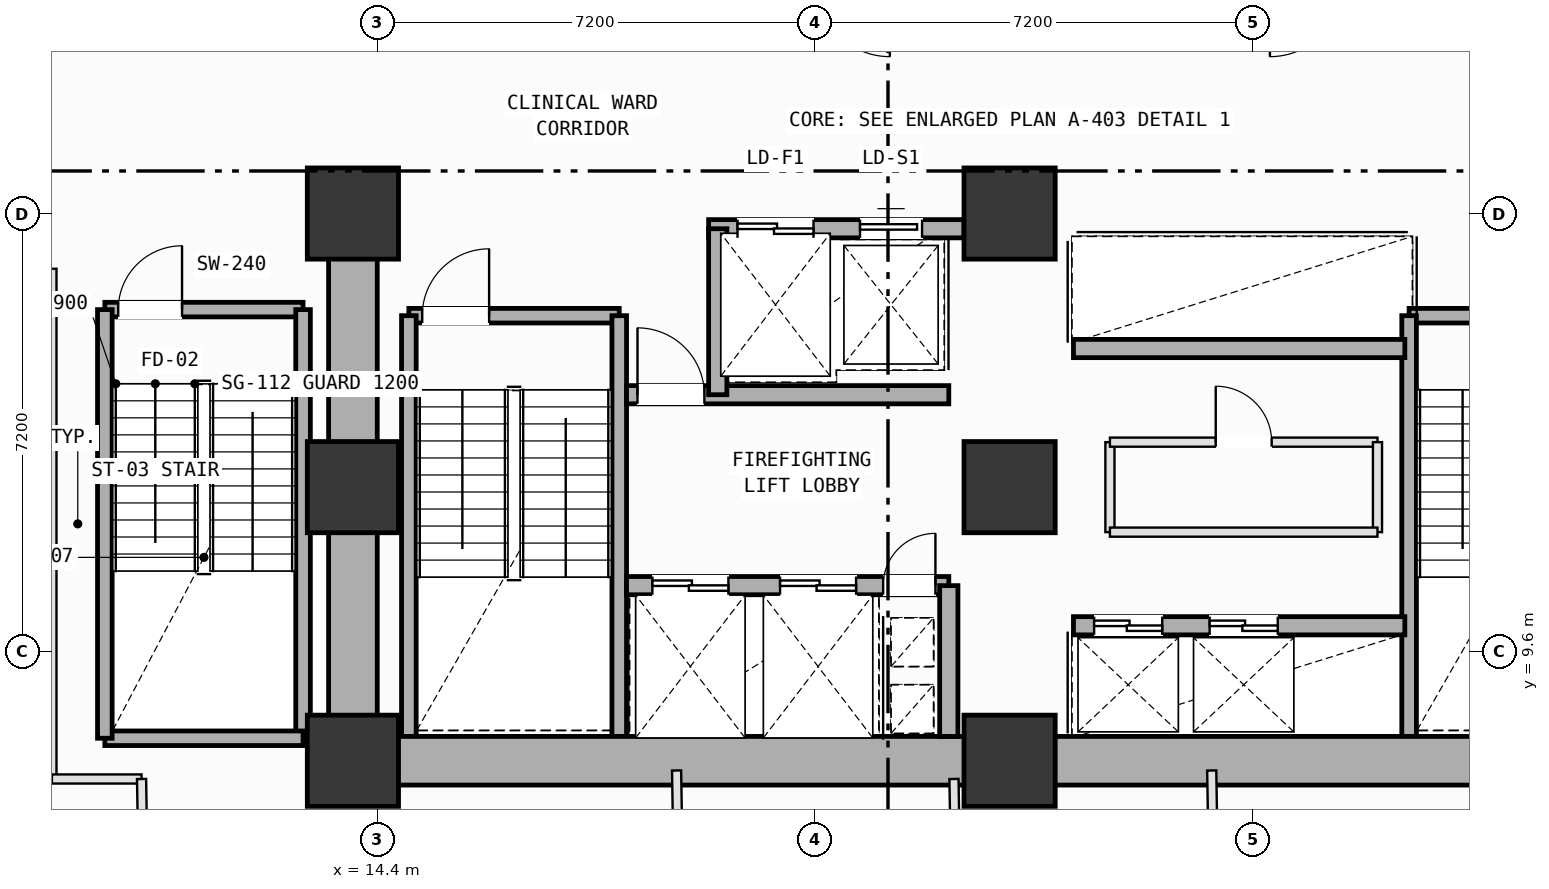
"""IFC4 building model, lengths in metres.
Left out: names, types, materials, properties, quantities, classifications, styles, units other than length and angle.
Written with IfcOpenShell. Run it as: python <this file> out.ifc"""

import sys

from ifc_helpers import new_model, si_unit, direction, frame, frame_2d, origin, origin_2d, place, context, subcontext, project, spatial, rectangle, extrude, element, fill, save


model = new_model("IFC4")
c1 = context("Model", 3, precision=1e-05, world=origin(), true_north=direction((0.0, 1.0)))
c2 = subcontext(c1, "Body", "Model", "MODEL_VIEW")
j1 = project(units=[si_unit("LENGTHUNIT", "METRE"), si_unit("PLANEANGLEUNIT", "RADIAN")], contexts=[c1])
p1 = place(None, origin())
s1 = spatial("IfcSite", under=j1, at=p1, CompositionType="ELEMENT")
p2 = place(p1, origin())
s2 = spatial("IfcBuilding", under=s1, at=p2, CompositionType="ELEMENT")
p3 = place(p2, frame((0.0, 0.0, 27.0)))
s3 = spatial("IfcBuildingStorey", under=s2, at=p3, CompositionType="ELEMENT", Elevation=27.0)
for number, where, z_axis, x_axis in (
    (1, (14.0, 7.8, 0.0), (0.0, 0.0, 1.0), (1.0, 0.0, 0.0)),
    (2, (14.0, 12.3, 0.0), (0.0, 0.0, 1.0), (1.0, 0.0, 0.0)),
    (3, (14.0, 16.8, 0.0), (0.0, 0.0, 1.0), (1.0, 0.0, 0.0)),
    (4, (24.8, 7.8, 0.0), (0.0, 0.0, 1.0), (1.0, 0.0, 0.0)),
    (5, (24.8, 12.3, 0.0), (0.0, 0.0, 1.0), (1.0, 0.0, 0.0)),
    (6, (24.8, 16.8, 0.0), (0.0, 0.0, 1.0), (1.0, 0.0, 0.0)),
):
    element("IfcColumn", number, at=place(p3, frame(where, z_axis=z_axis, x_axis=x_axis)), inside=s3, PredefinedType="COLUMN", context=c2, shape_type="SweptSolid", body=[
        extrude(rectangle(XDim=1.5, YDim=1.5, at=origin_2d()), origin(), (0.0, 0.0, 1.0), 4.0),
    ])
p4 = place(p3, frame((14.92, 15.12, 0.0), z_axis=(0.0, 0.0, 1.0), x_axis=(1.0, 0.0, 0.0)))
e7 = element("IfcWall", 7, at=p4, inside=s3, PredefinedType="SOLIDWALL", context=c2, shape_type="SweptSolid", body=[
    extrude(rectangle(XDim=3.46, YDim=0.24, at=frame_2d((1.73, 0.0))), origin(), (0.0, 0.0, 1.0), 3.78),
])
p5 = place(p4, frame((0.22, 0.0, 0.0)))
e8 = element("IfcOpeningElement", 8, at=p5, cuts=e7, PredefinedType="OPENING", context=c2, shape_type="SweptSolid", body=[
    extrude(rectangle(XDim=1.1, YDim=2.15, at=frame_2d((0.55, 1.075))), frame((0.0, 0.13, 0.0), z_axis=(0.0, -1.0, 0.0), x_axis=(1.0, 0.0, 0.0)), (0.0, 0.0, 1.0), 0.26),
])
for number, where, z_axis, x_axis in (
    (9, (18.38, 15.12, 0.0), (0.0, 0.0, 1.0), (0.0, -1.0, 0.0)),
    (10, (14.92, 8.2, 0.0), (0.0, 0.0, 1.0), (0.0, 1.0, 0.0)),
):
    element("IfcWall", number, at=place(p3, frame(where, z_axis=z_axis, x_axis=x_axis)), inside=s3, PredefinedType="SOLIDWALL", context=c2, shape_type="SweptSolid", body=[
        extrude(rectangle(XDim=6.92, YDim=0.24, at=frame_2d((3.46, 0.0))), origin(), (0.0, 0.0, 1.0), 3.78),
    ])
p6 = place(p3, frame((31.37, 15.12, 0.0), z_axis=(0.0, 0.0, 1.0), x_axis=(1.0, 0.0, 0.0)))
e11 = element("IfcWall", 11, at=p6, inside=s3, PredefinedType="SOLIDWALL", context=c2, shape_type="SweptSolid", body=[
    extrude(rectangle(XDim=3.46, YDim=0.24, at=frame_2d((1.73, 0.0))), origin(), (0.0, 0.0, 1.0), 3.78),
])
p7 = place(p6, frame((2.14, 0.0, 0.0)))
e12 = element("IfcOpeningElement", 12, at=p7, cuts=e11, PredefinedType="OPENING", context=c2, shape_type="SweptSolid", body=[
    extrude(rectangle(XDim=1.1, YDim=2.15, at=frame_2d((0.55, 1.075))), frame((0.0, 0.13, 0.0), z_axis=(0.0, -1.0, 0.0), x_axis=(1.0, 0.0, 0.0)), (0.0, 0.0, 1.0), 0.26),
])
p8 = place(p3, frame((31.37, 8.2, 0.0), z_axis=(0.0, 0.0, 1.0), x_axis=(0.0, 1.0, 0.0)))
e13 = element("IfcWall", 13, at=p8, inside=s3, PredefinedType="SOLIDWALL", context=c2, shape_type="SweptSolid", body=[
    extrude(rectangle(XDim=6.92, YDim=0.24, at=frame_2d((3.46, 0.0))), origin(), (0.0, 0.0, 1.0), 3.78),
])
p9 = place(p3, frame((9.92, 15.22, 0.0), z_axis=(0.0, 0.0, 1.0), x_axis=(1.0, 0.0, 0.0)))
e14 = element("IfcWall", 14, at=p9, inside=s3, PredefinedType="SOLIDWALL", context=c2, shape_type="SweptSolid", body=[
    extrude(rectangle(XDim=3.26, YDim=0.24, at=frame_2d((1.63, 0.0))), origin(), (0.0, 0.0, 1.0), 3.78),
])
p10 = place(p9, frame((0.22, 0.0, 0.0)))
e15 = element("IfcOpeningElement", 15, at=p10, cuts=e14, PredefinedType="OPENING", context=c2, shape_type="SweptSolid", body=[
    extrude(rectangle(XDim=1.05, YDim=2.15, at=frame_2d((0.525, 1.075))), frame((0.0, 0.13, 0.0), z_axis=(0.0, -1.0, 0.0), x_axis=(1.0, 0.0, 0.0)), (0.0, 0.0, 1.0), 0.26),
])
p11 = place(p3, frame((13.18, 15.22, 0.0), z_axis=(0.0, 0.0, 1.0), x_axis=(0.0, -1.0, 0.0)))
e16 = element("IfcWall", 16, at=p11, inside=s3, PredefinedType="SOLIDWALL", context=c2, shape_type="SweptSolid", body=[
    extrude(rectangle(XDim=7.05, YDim=0.24, at=frame_2d((3.525, 0.0))), origin(), (0.0, 0.0, 1.0), 3.78),
])
p12 = place(p3, frame((13.18, 8.17, 0.0), z_axis=(0.0, 0.0, 1.0), x_axis=(-1.0, 0.0, 0.0)))
e17 = element("IfcWall", 17, at=p12, inside=s3, PredefinedType="SOLIDWALL", context=c2, shape_type="SweptSolid", body=[
    extrude(rectangle(XDim=3.26, YDim=0.24, at=frame_2d((1.63, 0.0))), origin(), (0.0, 0.0, 1.0), 3.78),
])
p13 = place(p3, frame((9.92, 8.17, 0.0), z_axis=(0.0, 0.0, 1.0), x_axis=(0.0, 1.0, 0.0)))
e18 = element("IfcWall", 18, at=p13, inside=s3, PredefinedType="SOLIDWALL", context=c2, shape_type="SweptSolid", body=[
    extrude(rectangle(XDim=7.05, YDim=0.24, at=frame_2d((3.525, 0.0))), origin(), (0.0, 0.0, 1.0), 3.78),
])
for number, where, z_axis, x_axis in (
    (19, (14.0, 7.8, 0.0), (0.0, 0.0, 1.0), (1.0, 0.0, 0.0)),
    (20, (24.8, 7.8, 0.0), (0.0, 0.0, 1.0), (1.0, 0.0, 0.0)),
):
    element("IfcWall", number, at=place(p3, frame(where, z_axis=z_axis, x_axis=x_axis)), inside=s3, PredefinedType="SHEAR", context=c2, shape_type="SweptSolid", body=[
        extrude(rectangle(XDim=10.8, YDim=0.8, at=frame_2d((5.4, 0.0))), origin(), (0.0, 0.0, 1.0), 3.78),
    ])
p14 = place(p3, frame((14.0, 16.8, 0.0), z_axis=(0.0, 0.0, 1.0), x_axis=(0.0, -1.0, 0.0)))
e21 = element("IfcWall", 21, at=p14, inside=s3, PredefinedType="SHEAR", context=c2, shape_type="SweptSolid", body=[
    extrude(rectangle(XDim=9.0, YDim=0.8, at=frame_2d((4.5, 0.0))), origin(), (0.0, 0.0, 1.0), 3.78),
])
p15 = place(p3, frame((19.85, 16.55, 0.0), z_axis=(0.0, 0.0, 1.0), x_axis=(1.0, 0.0, 0.0)))
e22 = element("IfcWall", 22, at=p15, inside=s3, PredefinedType="SOLIDWALL", context=c2, shape_type="SweptSolid", body=[
    extrude(rectangle(XDim=4.2, YDim=0.3, at=frame_2d((2.1, 0.0))), origin(), (0.0, 0.0, 1.0), 3.78),
])
p16 = place(p15, frame((0.475, 0.0, 0.0)))
e23 = element("IfcOpeningElement", 23, at=p16, cuts=e22, PredefinedType="OPENING", context=c2, shape_type="SweptSolid", body=[
    extrude(rectangle(XDim=1.25, YDim=2.18, at=frame_2d((0.625, 1.09))), frame((0.0, 0.16, 0.0), z_axis=(0.0, -1.0, 0.0), x_axis=(1.0, 0.0, 0.0)), (0.0, 0.0, 1.0), 0.32),
])
p17 = place(p15, frame((2.49, 0.0, 0.0)))
e24 = element("IfcOpeningElement", 24, at=p17, cuts=e22, PredefinedType="OPENING", context=c2, shape_type="SweptSolid", body=[
    extrude(rectangle(XDim=1.02, YDim=2.12, at=frame_2d((0.51, 1.06))), frame((0.0, 0.16, 0.0), z_axis=(0.0, -1.0, 0.0), x_axis=(1.0, 0.0, 0.0)), (0.0, 0.0, 1.0), 0.32),
])
p18 = place(p3, frame((18.5, 10.68, 0.0), z_axis=(0.0, 0.0, 1.0), x_axis=(1.0, 0.0, 0.0)))
e25 = element("IfcWall", 25, at=p18, inside=s3, PredefinedType="SOLIDWALL", context=c2, shape_type="SweptSolid", body=[
    extrude(rectangle(XDim=5.3, YDim=0.3, at=frame_2d((2.65, 0.0))), origin(), (0.0, 0.0, 1.0), 3.78),
])
p19 = place(p18, frame((4.22, 0.0, 0.0)))
e26 = element("IfcOpeningElement", 26, at=p19, cuts=e25, PredefinedType="OPENING", context=c2, shape_type="SweptSolid", body=[
    extrude(rectangle(XDim=0.86, YDim=2.06, at=frame_2d((0.43, 1.03))), frame((0.0, 0.16, 0.0), z_axis=(0.0, -1.0, 0.0), x_axis=(1.0, 0.0, 0.0)), (0.0, 0.0, 1.0), 0.32),
])
p20 = place(p18, frame((0.425, 0.0, 0.0)))
e27 = element("IfcOpeningElement", 27, at=p20, cuts=e25, PredefinedType="OPENING", context=c2, shape_type="SweptSolid", body=[
    extrude(rectangle(XDim=1.25, YDim=2.18, at=frame_2d((0.625, 1.09))), frame((0.0, 0.16, 0.0), z_axis=(0.0, -1.0, 0.0), x_axis=(1.0, 0.0, 0.0)), (0.0, 0.0, 1.0), 0.32),
])
p21 = place(p18, frame((2.525, 0.0, 0.0)))
e28 = element("IfcOpeningElement", 28, at=p21, cuts=e25, PredefinedType="OPENING", context=c2, shape_type="SweptSolid", body=[
    extrude(rectangle(XDim=1.25, YDim=2.18, at=frame_2d((0.625, 1.09))), frame((0.0, 0.16, 0.0), z_axis=(0.0, -1.0, 0.0), x_axis=(1.0, 0.0, 0.0)), (0.0, 0.0, 1.0), 0.32),
])
p22 = place(p3, frame((18.5, 13.82, 0.0), z_axis=(0.0, 0.0, 1.0), x_axis=(1.0, 0.0, 0.0)))
e29 = element("IfcWall", 29, at=p22, inside=s3, PredefinedType="SOLIDWALL", context=c2, shape_type="SweptSolid", body=[
    extrude(rectangle(XDim=5.3, YDim=0.3, at=frame_2d((2.65, 0.0))), origin(), (0.0, 0.0, 1.0), 3.78),
])
p23 = place(p22, frame((0.18, 0.0, 0.0)))
e30 = element("IfcOpeningElement", 30, at=p23, cuts=e29, PredefinedType="OPENING", context=c2, shape_type="SweptSolid", body=[
    extrude(rectangle(XDim=1.1, YDim=2.15, at=frame_2d((0.55, 1.075))), frame((0.0, 0.16, 0.0), z_axis=(0.0, -1.0, 0.0), x_axis=(1.0, 0.0, 0.0)), (0.0, 0.0, 1.0), 0.32),
])
p24 = place(p3, frame((23.8, 8.2, 0.0), z_axis=(0.0, 0.0, 1.0), x_axis=(0.0, 1.0, 0.0)))
e31 = element("IfcWall", 31, at=p24, inside=s3, PredefinedType="SOLIDWALL", context=c2, shape_type="SweptSolid", body=[
    extrude(rectangle(XDim=2.48, YDim=0.3, at=frame_2d((1.24, 0.0))), origin(), (0.0, 0.0, 1.0), 3.78),
])
p25 = place(p3, frame((20.0, 13.82, 0.0), z_axis=(0.0, 0.0, 1.0), x_axis=(0.0, 1.0, 0.0)))
e32 = element("IfcWall", 32, at=p25, inside=s3, PredefinedType="SOLIDWALL", context=c2, shape_type="SweptSolid", body=[
    extrude(rectangle(XDim=2.73, YDim=0.3, at=frame_2d((1.365, 0.0))), origin(), (0.0, 0.0, 1.0), 3.78),
])
p26 = place(p3, frame((25.85, 10.02, 0.0), z_axis=(0.0, 0.0, 1.0), x_axis=(1.0, 0.0, 0.0)))
e33 = element("IfcWall", 33, at=p26, inside=s3, PredefinedType="SOLIDWALL", context=c2, shape_type="SweptSolid", body=[
    extrude(rectangle(XDim=5.45, YDim=0.3, at=frame_2d((2.725, 0.0))), origin(), (0.0, 0.0, 1.0), 3.78),
])
p27 = place(p26, frame((0.34, 0.0, 0.0)))
e34 = element("IfcOpeningElement", 34, at=p27, cuts=e33, PredefinedType="OPENING", context=c2, shape_type="SweptSolid", body=[
    extrude(rectangle(XDim=1.12, YDim=2.15, at=frame_2d((0.56, 1.075))), frame((0.0, 0.16, 0.0), z_axis=(0.0, -1.0, 0.0), x_axis=(1.0, 0.0, 0.0)), (0.0, 0.0, 1.0), 0.32),
])
p28 = place(p26, frame((2.24, 0.0, 0.0)))
e35 = element("IfcOpeningElement", 35, at=p28, cuts=e33, PredefinedType="OPENING", context=c2, shape_type="SweptSolid", body=[
    extrude(rectangle(XDim=1.12, YDim=2.15, at=frame_2d((0.56, 1.075))), frame((0.0, 0.16, 0.0), z_axis=(0.0, -1.0, 0.0), x_axis=(1.0, 0.0, 0.0)), (0.0, 0.0, 1.0), 0.32),
])
p29 = place(p3, frame((25.85, 14.58, 0.0), z_axis=(0.0, 0.0, 1.0), x_axis=(1.0, 0.0, 0.0)))
e36 = element("IfcWall", 36, at=p29, inside=s3, PredefinedType="SOLIDWALL", context=c2, shape_type="SweptSolid", body=[
    extrude(rectangle(XDim=5.45, YDim=0.3, at=frame_2d((2.725, 0.0))), origin(), (0.0, 0.0, 1.0), 3.78),
])
p30 = place(p3, frame((26.45, 11.56, 0.0), z_axis=(0.0, 0.0, 1.0), x_axis=(0.0, 1.0, 0.0)))
e37 = element("IfcWall", 37, at=p30, inside=s3, PredefinedType="PARTITIONING", context=c2, shape_type="SweptSolid", body=[
    extrude(rectangle(XDim=1.48, YDim=0.15, at=frame_2d((0.74, 0.0))), origin(), (0.0, 0.0, 1.0), 3.78),
])
p31 = place(p3, frame((26.45, 13.04, 0.0), z_axis=(0.0, 0.0, 1.0), x_axis=(1.0, 0.0, 0.0)))
e38 = element("IfcWall", 38, at=p31, inside=s3, PredefinedType="PARTITIONING", context=c2, shape_type="SweptSolid", body=[
    extrude(rectangle(XDim=4.4, YDim=0.15, at=frame_2d((2.2, 0.0))), origin(), (0.0, 0.0, 1.0), 3.78),
])
p32 = place(p31, frame((1.74, 0.0, 0.0)))
e39 = element("IfcOpeningElement", 39, at=p32, cuts=e38, PredefinedType="OPENING", context=c2, shape_type="SweptSolid", body=[
    extrude(rectangle(XDim=0.92, YDim=2.1, at=frame_2d((0.46, 1.05))), frame((0.0, 0.085, 0.0), z_axis=(0.0, -1.0, 0.0), x_axis=(1.0, 0.0, 0.0)), (0.0, 0.0, 1.0), 0.17),
])
p33 = place(p3, frame((30.85, 13.04, 0.0), z_axis=(0.0, 0.0, 1.0), x_axis=(0.0, -1.0, 0.0)))
e40 = element("IfcWall", 40, at=p33, inside=s3, PredefinedType="PARTITIONING", context=c2, shape_type="SweptSolid", body=[
    extrude(rectangle(XDim=1.48, YDim=0.15, at=frame_2d((0.74, 0.0))), origin(), (0.0, 0.0, 1.0), 3.78),
])
p34 = place(p3, frame((30.85, 11.56, 0.0), z_axis=(0.0, 0.0, 1.0), x_axis=(-1.0, 0.0, 0.0)))
e41 = element("IfcWall", 41, at=p34, inside=s3, PredefinedType="PARTITIONING", context=c2, shape_type="SweptSolid", body=[
    extrude(rectangle(XDim=4.4, YDim=0.15, at=frame_2d((2.2, 0.0))), origin(), (0.0, 0.0, 1.0), 3.78),
])
p35 = place(p3, frame((9.05, 15.892, 0.0), z_axis=(0.0, 0.0, 1.0), x_axis=(0.0, -1.0, 0.0)))
e42 = element("IfcWall", 42, at=p35, inside=s3, PredefinedType="PARTITIONING", context=c2, shape_type="SweptSolid", body=[
    extrude(rectangle(XDim=8.392, YDim=0.15, at=frame_2d((4.196, 0.0))), origin(), (0.0, 0.0, 1.0), 3.78),
])
p36 = place(p3, frame((9.05, 7.5, 0.0), z_axis=(0.0, 0.0, 1.0), x_axis=(1.0, 0.0, 0.0)))
e43 = element("IfcWall", 43, at=p36, inside=s3, PredefinedType="PARTITIONING", context=c2, shape_type="SweptSolid", body=[
    extrude(rectangle(XDim=1.474, YDim=0.15, at=frame_2d((0.737, 0.0))), origin(), (0.0, 0.0, 1.0), 3.78),
])
p37 = place(p3, frame((10.524, 7.5, 0.0), z_axis=(0.0, 0.0, 1.0), x_axis=(0.016574384143, -0.999862635461, 0.0)))
e44 = element("IfcWall", 44, at=p37, inside=s3, PredefinedType="PARTITIONING", context=c2, shape_type="SweptSolid", body=[
    extrude(rectangle(XDim=5.2, YDim=0.15, at=frame_2d((2.6, 0.0))), origin(), (0.0, 0.0, 1.0), 3.78),
])
p38 = place(p3, frame((19.323, 7.64, 0.0), z_axis=(0.0, 0.0, 1.0), x_axis=(0.01654686451, -0.999863091265, 0.0)))
e45 = element("IfcWall", 45, at=p38, inside=s3, PredefinedType="PARTITIONING", context=c2, shape_type="SweptSolid", body=[
    extrude(rectangle(XDim=5.194, YDim=0.15, at=frame_2d((2.597, 0.0))), origin(), (0.0, 0.0, 1.0), 3.78),
])
p39 = place(p3, frame((28.124, 7.64, 0.0), z_axis=(0.0, 0.0, 1.0), x_axis=(0.016468725329, -0.999864381347, 0.0)))
e46 = element("IfcWall", 46, at=p39, inside=s3, PredefinedType="PARTITIONING", context=c2, shape_type="SweptSolid", body=[
    extrude(rectangle(XDim=3.098, YDim=0.15, at=frame_2d((1.549, 0.0))), origin(), (0.0, 0.0, 1.0), 3.78),
])
p40 = place(p39, frame((1.223, 0.0, 0.0)))
e47 = element("IfcOpeningElement", 47, at=p40, cuts=e46, PredefinedType="OPENING", context=c2, shape_type="SweptSolid", body=[
    extrude(rectangle(XDim=0.86, YDim=2.06, at=frame_2d((0.43, 1.03))), frame((0.0, 0.085, 0.0), z_axis=(0.0, -1.0, 0.0), x_axis=(1.0, 0.0, 0.0)), (0.0, 0.0, 1.0), 0.17),
])
p41 = place(p3, frame((23.936, 4.472, 0.0), z_axis=(0.0, 0.0, 1.0), x_axis=(-0.01684837005, 0.999858056139, 0.0)))
e48 = element("IfcWall", 48, at=p41, inside=s3, PredefinedType="PARTITIONING", context=c2, shape_type="SweptSolid", body=[
    extrude(rectangle(XDim=3.029, YDim=0.15, at=frame_2d((1.514, 0.0))), origin(), (0.0, 0.0, 1.0), 3.78),
])
p42 = place(p5, origin())
e49 = element("IfcDoor", 49, at=p42, inside=s3, OperationType="SINGLE_SWING_RIGHT", PredefinedType="DOOR", context=c2, shape_type="SweptSolid", body=[
    extrude(rectangle(XDim=1.1, YDim=2.15, at=frame_2d((0.55, 1.075))), frame((0.0, 0.025, 0.0), z_axis=(0.0, -1.0, 0.0), x_axis=(1.0, 0.0, 0.0)), (0.0, 0.0, 1.0), 0.05),
])
fill(e8, e49)
p43 = place(p10, origin())
e50 = element("IfcDoor", 50, at=p43, inside=s3, OperationType="SINGLE_SWING_RIGHT", PredefinedType="DOOR", context=c2, shape_type="SweptSolid", body=[
    extrude(rectangle(XDim=1.05, YDim=2.15, at=frame_2d((0.525, 1.075))), frame((0.0, 0.025, 0.0), z_axis=(0.0, -1.0, 0.0), x_axis=(1.0, 0.0, 0.0)), (0.0, 0.0, 1.0), 0.05),
])
fill(e15, e50)
p44 = place(p19, origin())
e51 = element("IfcDoor", 51, at=p44, inside=s3, OperationType="SINGLE_SWING_RIGHT", PredefinedType="DOOR", context=c2, shape_type="SweptSolid", body=[
    extrude(rectangle(XDim=0.86, YDim=2.06, at=frame_2d((0.43, 1.03))), frame((0.0, 0.025, 0.0), z_axis=(0.0, -1.0, 0.0), x_axis=(1.0, 0.0, 0.0)), (0.0, 0.0, 1.0), 0.05),
])
fill(e26, e51)
p45 = place(p23, origin())
e52 = element("IfcDoor", 52, at=p45, inside=s3, OperationType="SINGLE_SWING_LEFT", PredefinedType="DOOR", context=c2, shape_type="SweptSolid", body=[
    extrude(rectangle(XDim=1.1, YDim=2.15, at=frame_2d((0.55, 1.075))), frame((0.0, 0.025, 0.0), z_axis=(0.0, -1.0, 0.0), x_axis=(1.0, 0.0, 0.0)), (0.0, 0.0, 1.0), 0.05),
])
fill(e30, e52)
p46 = place(p20, origin())
e53 = element("IfcDoor", 53, at=p46, inside=s3, OperationType="DOUBLE_DOOR_SLIDING", PredefinedType="DOOR", context=c2, shape_type="SweptSolid", body=[
    extrude(rectangle(XDim=1.25, YDim=2.18, at=frame_2d((0.625, 1.09))), frame((0.0, 0.025, 0.0), z_axis=(0.0, -1.0, 0.0), x_axis=(1.0, 0.0, 0.0)), (0.0, 0.0, 1.0), 0.05),
])
fill(e27, e53)
p47 = place(p21, origin())
e54 = element("IfcDoor", 54, at=p47, inside=s3, OperationType="DOUBLE_DOOR_SLIDING", PredefinedType="DOOR", context=c2, shape_type="SweptSolid", body=[
    extrude(rectangle(XDim=1.25, YDim=2.18, at=frame_2d((0.625, 1.09))), frame((0.0, 0.025, 0.0), z_axis=(0.0, -1.0, 0.0), x_axis=(1.0, 0.0, 0.0)), (0.0, 0.0, 1.0), 0.05),
])
fill(e28, e54)
p48 = place(p27, origin())
e55 = element("IfcDoor", 55, at=p48, inside=s3, OperationType="DOUBLE_DOOR_SLIDING", PredefinedType="DOOR", context=c2, shape_type="SweptSolid", body=[
    extrude(rectangle(XDim=1.12, YDim=2.15, at=frame_2d((0.56, 1.075))), frame((0.0, 0.025, 0.0), z_axis=(0.0, -1.0, 0.0), x_axis=(1.0, 0.0, 0.0)), (0.0, 0.0, 1.0), 0.05),
])
fill(e34, e55)
p49 = place(p28, origin())
e56 = element("IfcDoor", 56, at=p49, inside=s3, OperationType="DOUBLE_DOOR_SLIDING", PredefinedType="DOOR", context=c2, shape_type="SweptSolid", body=[
    extrude(rectangle(XDim=1.12, YDim=2.15, at=frame_2d((0.56, 1.075))), frame((0.0, 0.025, 0.0), z_axis=(0.0, -1.0, 0.0), x_axis=(1.0, 0.0, 0.0)), (0.0, 0.0, 1.0), 0.05),
])
fill(e35, e56)
p50 = place(p16, origin())
e57 = element("IfcDoor", 57, at=p50, inside=s3, OperationType="DOUBLE_DOOR_SLIDING", PredefinedType="DOOR", context=c2, shape_type="SweptSolid", body=[
    extrude(rectangle(XDim=1.25, YDim=2.18, at=frame_2d((0.625, 1.09))), frame((0.0, 0.025, 0.0), z_axis=(0.0, -1.0, 0.0), x_axis=(1.0, 0.0, 0.0)), (0.0, 0.0, 1.0), 0.05),
])
fill(e23, e57)
p51 = place(p17, origin())
e58 = element("IfcDoor", 58, at=p51, inside=s3, OperationType="SLIDING_TO_LEFT", PredefinedType="DOOR", context=c2, shape_type="SweptSolid", body=[
    extrude(rectangle(XDim=1.02, YDim=2.12, at=frame_2d((0.51, 1.06))), frame((0.0, 0.025, 0.0), z_axis=(0.0, -1.0, 0.0), x_axis=(1.0, 0.0, 0.0)), (0.0, 0.0, 1.0), 0.05),
])
fill(e24, e58)
p52 = place(p32, origin())
e59 = element("IfcDoor", 59, at=p52, inside=s3, OperationType="SINGLE_SWING_LEFT", PredefinedType="DOOR", context=c2, shape_type="SweptSolid", body=[
    extrude(rectangle(XDim=0.92, YDim=2.1, at=frame_2d((0.46, 1.05))), frame((0.0, 0.025, 0.0), z_axis=(0.0, -1.0, 0.0), x_axis=(1.0, 0.0, 0.0)), (0.0, 0.0, 1.0), 0.05),
])
fill(e39, e59)
save(model, sys.argv[1])
